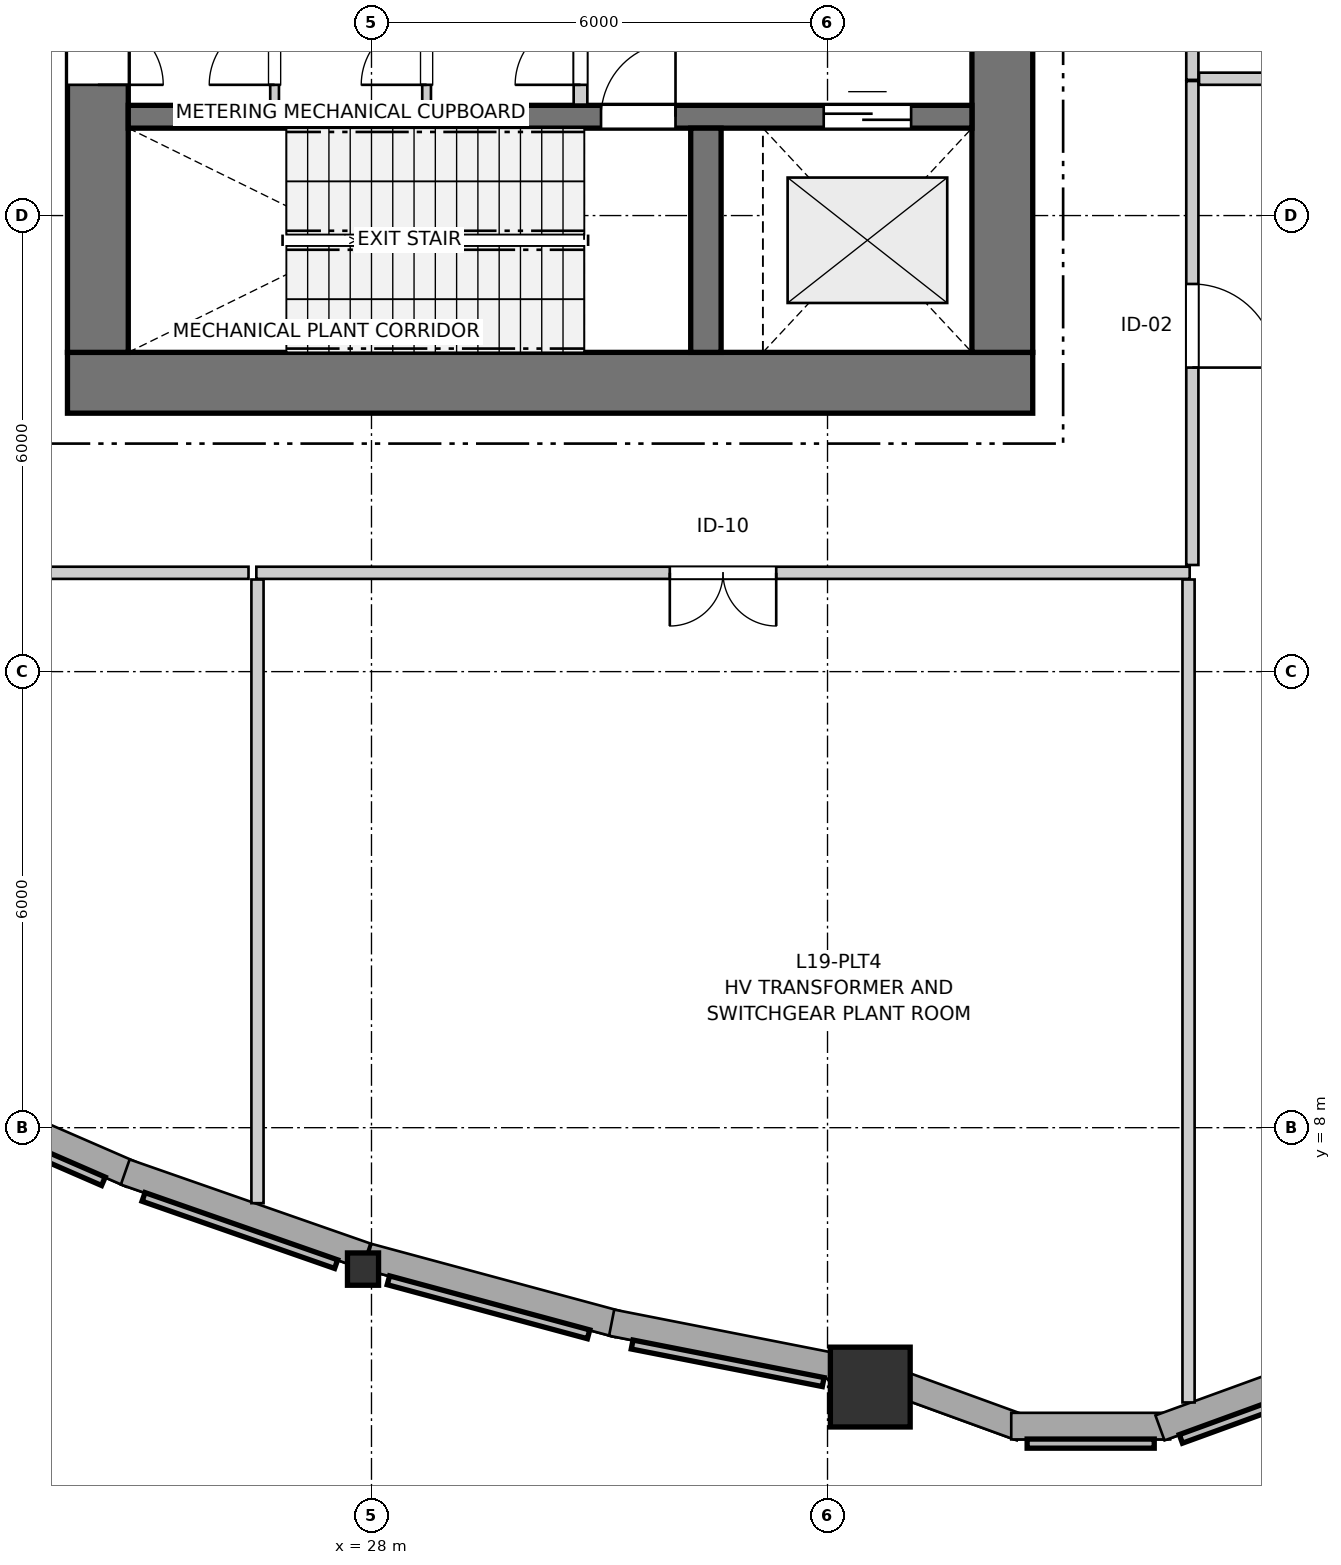
"""IFC4 building model, lengths in metres.
Left out: names, types, materials, properties, quantities, classifications, styles, units other than length and angle.
Written with IfcOpenShell. Run it as: python <this file> out.ifc"""

import sys

from ifc_helpers import new_model, si_unit, direction, frame, frame_2d, origin, origin_2d, place, context, subcontext, project, spatial, rectangle, i_section, extrude, source, transform, mapped, element, fill, save


model = new_model("IFC4")
c1 = context("Model", 3, precision=1e-05, world=origin(), true_north=direction((0.0, 1.0)))
c2 = subcontext(c1, "Body", "Model", "MODEL_VIEW")
j1 = project(units=[si_unit("LENGTHUNIT", "METRE"), si_unit("PLANEANGLEUNIT", "RADIAN")], contexts=[c1])
p1 = place(None, origin())
s1 = spatial("IfcSite", under=j1, at=p1, CompositionType="ELEMENT")
p2 = place(p1, origin())
s2 = spatial("IfcBuilding", under=s1, at=p2, CompositionType="ELEMENT")
p3 = place(p2, frame((0.0, 0.0, 65.4)))
s3 = spatial("IfcBuildingStorey", under=s2, at=p3, CompositionType="ELEMENT", Elevation=65.4)
p4 = place(p3, frame((24.0, 17.8, 0.0), z_axis=(0.0, 0.0, 1.0), x_axis=(1.0, 0.0, 0.0)))
e1 = element("IfcWall", 1, at=p4, inside=s3, PredefinedType="SHEAR", context=c2, shape_type="SweptSolid", body=[
    extrude(rectangle(XDim=12.7, YDim=0.8, at=frame_2d((6.35, 0.0))), origin(), (0.0, 0.0, 1.0), 4.75),
])
p5 = place(p3, frame((24.4, 33.8, 0.0), z_axis=(0.0, 0.0, 1.0), x_axis=(0.0, -1.0, 0.0)))
e2 = element("IfcWall", 2, at=p5, inside=s3, PredefinedType="SHEAR", context=c2, shape_type="SweptSolid", body=[
    extrude(rectangle(XDim=15.6, YDim=0.8, at=frame_2d((7.8, 0.0))), origin(), (0.0, 0.0, 1.0), 4.75),
])
p6 = place(p5, frame((7.05, 0.0, 0.0)))
e3 = element("IfcOpeningElement", 3, at=p6, cuts=e2, PredefinedType="OPENING", context=c2, shape_type="SweptSolid", body=[
    extrude(rectangle(XDim=1.5, YDim=2.15, at=frame_2d((0.75, 1.075))), frame((0.0, 0.41, 0.0), z_axis=(0.0, -1.0, 0.0), x_axis=(1.0, 0.0, 0.0)), (0.0, 0.0, 1.0), 0.82),
])
p7 = place(p5, frame((3.52, 0.0, 0.0)))
e4 = element("IfcOpeningElement", 4, at=p7, cuts=e2, PredefinedType="OPENING", context=c2, shape_type="SweptSolid", body=[
    extrude(rectangle(XDim=0.86, YDim=2.05, at=frame_2d((0.43, 1.025))), frame((0.0, 0.41, 0.0), z_axis=(0.0, -1.0, 0.0), x_axis=(1.0, 0.0, 0.0)), (0.0, 0.0, 1.0), 0.82),
])
p8 = place(p5, frame((11.22, 0.0, 0.0)))
e5 = element("IfcOpeningElement", 5, at=p8, cuts=e2, PredefinedType="OPENING", context=c2, shape_type="SweptSolid", body=[
    extrude(rectangle(XDim=0.86, YDim=2.05, at=frame_2d((0.43, 1.025))), frame((0.0, 0.41, 0.0), z_axis=(0.0, -1.0, 0.0), x_axis=(1.0, 0.0, 0.0)), (0.0, 0.0, 1.0), 0.82),
])
p9 = place(p3, frame((36.3, 18.2, 0.0), z_axis=(0.0, 0.0, 1.0), x_axis=(0.0, 1.0, 0.0)))
e6 = element("IfcWall", 6, at=p9, inside=s3, PredefinedType="SHEAR", context=c2, shape_type="SweptSolid", body=[
    extrude(rectangle(XDim=15.6, YDim=0.8, at=frame_2d((7.8, 0.0))), origin(), (0.0, 0.0, 1.0), 4.75),
])
p10 = place(p9, frame((4.25, 0.0, 0.0)))
e7 = element("IfcOpeningElement", 7, at=p10, cuts=e6, PredefinedType="OPENING", context=c2, shape_type="SweptSolid", body=[
    extrude(rectangle(XDim=1.1, YDim=2.15, at=frame_2d((0.55, 1.075))), frame((0.0, 0.41, 0.0), z_axis=(0.0, -1.0, 0.0), x_axis=(1.0, 0.0, 0.0)), (0.0, 0.0, 1.0), 0.82),
])
p11 = place(p9, frame((10.25, 0.0, 0.0)))
e8 = element("IfcOpeningElement", 8, at=p11, cuts=e6, PredefinedType="OPENING", context=c2, shape_type="SweptSolid", body=[
    extrude(rectangle(XDim=1.1, YDim=2.15, at=frame_2d((0.55, 1.075))), frame((0.0, 0.41, 0.0), z_axis=(0.0, -1.0, 0.0), x_axis=(1.0, 0.0, 0.0)), (0.0, 0.0, 1.0), 0.82),
])
p12 = place(p3, frame((24.8, 21.3, 0.0), z_axis=(0.0, 0.0, 1.0), x_axis=(1.0, 0.0, 0.0)))
e9 = element("IfcWall", 9, at=p12, inside=s3, PredefinedType="SHEAR", context=c2, shape_type="SweptSolid", body=[
    extrude(rectangle(XDim=11.1, YDim=0.3, at=frame_2d((5.55, 0.0))), origin(), (0.0, 0.0, 1.0), 4.75),
])
p13 = place(p12, frame((6.22, 0.0, 0.0)))
e10 = element("IfcOpeningElement", 10, at=p13, cuts=e9, PredefinedType="OPENING", context=c2, shape_type="SweptSolid", body=[
    extrude(rectangle(XDim=0.98, YDim=2.15, at=frame_2d((0.49, 1.075))), frame((0.0, 0.16, 0.0), z_axis=(0.0, -1.0, 0.0), x_axis=(1.0, 0.0, 0.0)), (0.0, 0.0, 1.0), 0.32),
])
p14 = place(p12, frame((9.15, 0.0, 0.0)))
e11 = element("IfcOpeningElement", 11, at=p14, cuts=e9, PredefinedType="OPENING", context=c2, shape_type="SweptSolid", body=[
    extrude(rectangle(XDim=1.15, YDim=2.15, at=frame_2d((0.575, 1.075))), frame((0.0, 0.16, 0.0), z_axis=(0.0, -1.0, 0.0), x_axis=(1.0, 0.0, 0.0)), (0.0, 0.0, 1.0), 0.32),
])
p15 = place(p3, frame((32.4, 18.2, 0.0), z_axis=(0.0, 0.0, 1.0), x_axis=(0.0, 1.0, 0.0)))
e12 = element("IfcWall", 12, at=p15, inside=s3, PredefinedType="SHEAR", context=c2, shape_type="SweptSolid", body=[
    extrude(rectangle(XDim=2.95, YDim=0.4, at=frame_2d((1.475, 0.0))), origin(), (0.0, 0.0, 1.0), 4.75),
])
m1 = source(origin(), c2, "Body", "SweptSolid", [
    extrude(i_section(OverallWidth=0.409, OverallDepth=0.425, WebThickness=0.03, FlangeThickness=0.048, FilletRadius=0.015, at=origin_2d()), origin(), (0.0, 0.0, 1.0), 4.75),
])
p16 = place(p3, frame((27.888, 6.139, 0.0), z_axis=(0.0, 0.0, 1.0), x_axis=(1.0, 0.0, 0.0)))
e13 = element("IfcColumn", 13, at=p16, inside=s3, PredefinedType="PILASTER", context=c2, shape_type="MappedRepresentation", body=[
    mapped(m1, transform((0.0, 0.0, 0.0), x_axis=(1.0, 0.0, 0.0), y_axis=(0.0, 1.0, 0.0), z_axis=(0.0, 0.0, 1.0), scale=1.0)),
])
m2 = source(origin(), c2, "Body", "SweptSolid", [
    extrude(rectangle(XDim=1.05, YDim=1.05, at=origin_2d()), origin(), (0.0, 0.0, 1.0), 4.75),
])
p17 = place(p3, frame((34.562, 4.587, 0.0), z_axis=(0.0, 0.0, 1.0), x_axis=(1.0, 0.0, 0.0)))
e14 = element("IfcColumn", 14, at=p17, inside=s3, PredefinedType="COLUMN", context=c2, shape_type="MappedRepresentation", body=[
    mapped(m2, transform((0.0, 0.0, 0.0), x_axis=(1.0, 0.0, 0.0), y_axis=(0.0, 1.0, 0.0), z_axis=(0.0, 0.0, 1.0), scale=1.0)),
])
p18 = place(p3, frame((22.058, 8.595, 0.0), z_axis=(0.0, 0.0, 1.0), x_axis=(0.917112224483, -0.398629110458, 0.0)))
e15 = element("IfcWall", 15, at=p18, inside=s3, PredefinedType="SOLIDWALL", context=c2, shape_type="SweptSolid", body=[
    extrude(rectangle(XDim=3.037, YDim=0.35, at=frame_2d((1.519, 0.0))), origin(), (0.0, 0.0, 1.0), 4.23),
])
p19 = place(p3, frame((24.76, 7.417, 0.0), z_axis=(0.0, 0.0, 1.0), x_axis=(0.944134890247, -0.329559264804, 0.0)))
e16 = element("IfcWall", 16, at=p19, inside=s3, PredefinedType="SOLIDWALL", context=c2, shape_type="SweptSolid", body=[
    extrude(rectangle(XDim=3.354, YDim=0.35, at=frame_2d((1.677, 0.0))), origin(), (0.0, 0.0, 1.0), 4.23),
])
p20 = place(p3, frame((27.953, 6.303, 0.0), z_axis=(0.0, 0.0, 1.0), x_axis=(0.965464207527, -0.260535724968, 0.0)))
e17 = element("IfcWall", 17, at=p20, inside=s3, PredefinedType="SOLIDWALL", context=c2, shape_type="SweptSolid", body=[
    extrude(rectangle(XDim=3.41, YDim=0.35, at=frame_2d((1.705, 0.0))), origin(), (0.0, 0.0, 1.0), 4.23),
])
p21 = place(p3, frame((31.16, 5.435, 0.0), z_axis=(0.0, 0.0, 1.0), x_axis=(0.981237747431, -0.192801667567, 0.0)))
e18 = element("IfcWall", 18, at=p21, inside=s3, PredefinedType="SOLIDWALL", context=c2, shape_type="SweptSolid", body=[
    extrude(rectangle(XDim=3.202, YDim=0.35, at=frame_2d((1.601, 0.0))), origin(), (0.0, 0.0, 1.0), 4.23),
])
p22 = place(p3, frame((34.904, 4.649, 0.0), z_axis=(0.0, 0.0, 1.0), x_axis=(0.939675390388, -0.342067479745, 0.0)))
e19 = element("IfcWall", 19, at=p22, inside=s3, PredefinedType="SOLIDWALL", context=c2, shape_type="SweptSolid", body=[
    extrude(rectangle(XDim=1.752, YDim=0.35, at=frame_2d((0.876, 0.0))), origin(), (0.0, 0.0, 1.0), 4.23),
])
p23 = place(p3, frame((36.417, 4.073, 0.0), z_axis=(0.0, 0.0, 1.0), x_axis=(1.0, 0.0, 0.0)))
e20 = element("IfcWall", 20, at=p23, inside=s3, PredefinedType="SOLIDWALL", context=c2, shape_type="SweptSolid", body=[
    extrude(rectangle(XDim=2.091, YDim=0.35, at=frame_2d((1.045, 0.0))), origin(), (0.0, 0.0, 1.0), 4.23),
])
p24 = place(p3, frame((38.374, 4.05, 0.0), z_axis=(0.0, 0.0, 1.0), x_axis=(0.939711556618, 0.341968113072, 0.0)))
e21 = element("IfcWall", 21, at=p24, inside=s3, PredefinedType="SOLIDWALL", context=c2, shape_type="SweptSolid", body=[
    extrude(rectangle(XDim=2.09, YDim=0.35, at=frame_2d((1.045, 0.0))), origin(), (0.0, 0.0, 1.0), 4.23),
])
p25 = place(p3, frame((30.75, 21.46, 0.0), z_axis=(0.0, 0.0, 1.0), x_axis=(0.0, 1.0, 0.0)))
e22 = element("IfcWall", 22, at=p25, inside=s3, PredefinedType="PARTITIONING", context=c2, shape_type="SweptSolid", body=[
    extrude(rectangle(XDim=3.11, YDim=0.18, at=frame_2d((1.555, 0.0))), origin(), (0.0, 0.0, 1.0), 4.75),
])
p26 = place(p25, frame((0.26, 0.0, 0.0)))
e23 = element("IfcOpeningElement", 23, at=p26, cuts=e22, PredefinedType="OPENING", context=c2, shape_type="SweptSolid", body=[
    extrude(rectangle(XDim=0.86, YDim=2.05, at=frame_2d((0.43, 1.025))), frame((0.0, 0.1, 0.0), z_axis=(0.0, -1.0, 0.0), x_axis=(1.0, 0.0, 0.0)), (0.0, 0.0, 1.0), 0.2),
])
p27 = place(p3, frame((26.725, 21.46, 0.0), z_axis=(0.0, 0.0, 1.0), x_axis=(0.0, 1.0, 0.0)))
e24 = element("IfcWall", 24, at=p27, inside=s3, PredefinedType="PARTITIONING", context=c2, shape_type="SweptSolid", body=[
    extrude(rectangle(XDim=1.38, YDim=0.115, at=frame_2d((0.69, 0.0))), origin(), (0.0, 0.0, 1.0), 4.75),
])
p28 = place(p27, frame((0.26, 0.0, 0.0)))
e25 = element("IfcOpeningElement", 25, at=p28, cuts=e24, PredefinedType="OPENING", context=c2, shape_type="SweptSolid", body=[
    extrude(rectangle(XDim=0.86, YDim=2.05, at=frame_2d((0.43, 1.025))), frame((0.0, 0.067, 0.0), z_axis=(0.0, -1.0, 0.0), x_axis=(1.0, 0.0, 0.0)), (0.0, 0.0, 1.0), 0.135),
])
p29 = place(p3, frame((28.725, 21.46, 0.0), z_axis=(0.0, 0.0, 1.0), x_axis=(0.0, 1.0, 0.0)))
e26 = element("IfcWall", 26, at=p29, inside=s3, PredefinedType="PARTITIONING", context=c2, shape_type="SweptSolid", body=[
    extrude(rectangle(XDim=1.38, YDim=0.115, at=frame_2d((0.69, 0.0))), origin(), (0.0, 0.0, 1.0), 4.75),
])
p30 = place(p29, frame((0.26, 0.0, 0.0)))
e27 = element("IfcOpeningElement", 27, at=p30, cuts=e26, PredefinedType="OPENING", context=c2, shape_type="SweptSolid", body=[
    extrude(rectangle(XDim=0.86, YDim=2.05, at=frame_2d((0.43, 1.025))), frame((0.0, 0.067, 0.0), z_axis=(0.0, -1.0, 0.0), x_axis=(1.0, 0.0, 0.0)), (0.0, 0.0, 1.0), 0.135),
])
p31 = place(p3, frame((38.765, 15.3, 0.0), z_axis=(0.0, 0.0, 1.0), x_axis=(-1.0, 0.0, 0.0)))
e28 = element("IfcWall", 28, at=p31, inside=s3, PredefinedType="PARTITIONING", context=c2, shape_type="SweptSolid", body=[
    extrude(rectangle(XDim=12.28, YDim=0.16, at=frame_2d((6.14, 0.0))), origin(), (0.0, 0.0, 1.0), 4.75),
])
p32 = place(p31, frame((5.44, 0.0, 0.0)))
e29 = element("IfcOpeningElement", 29, at=p32, cuts=e28, PredefinedType="OPENING", context=c2, shape_type="SweptSolid", body=[
    extrude(rectangle(XDim=1.4, YDim=2.15, at=frame_2d((0.7, 1.075))), frame((0.0, 0.09, 0.0), z_axis=(0.0, -1.0, 0.0), x_axis=(1.0, 0.0, 0.0)), (0.0, 0.0, 1.0), 0.18),
])
p33 = place(p3, frame((38.8, 30.215, 0.0), z_axis=(0.0, 0.0, 1.0), x_axis=(0.0, -1.0, 0.0)))
e30 = element("IfcWall", 30, at=p33, inside=s3, PredefinedType="PARTITIONING", context=c2, shape_type="SweptSolid", body=[
    extrude(rectangle(XDim=8.43, YDim=0.16, at=frame_2d((4.215, 0.0))), origin(), (0.0, 0.0, 1.0), 4.75),
])
p34 = place(p33, frame((3.515, 0.0, 0.0)))
e31 = element("IfcOpeningElement", 31, at=p34, cuts=e30, PredefinedType="OPENING", context=c2, shape_type="SweptSolid", body=[
    extrude(rectangle(XDim=1.4, YDim=2.15, at=frame_2d((0.7, 1.075))), frame((0.0, 0.09, 0.0), z_axis=(0.0, -1.0, 0.0), x_axis=(1.0, 0.0, 0.0)), (0.0, 0.0, 1.0), 0.18),
])
p35 = place(p3, frame((38.8, 21.77, 0.0), z_axis=(0.0, 0.0, 1.0), x_axis=(0.0, -1.0, 0.0)))
e32 = element("IfcWall", 32, at=p35, inside=s3, PredefinedType="PARTITIONING", context=c2, shape_type="SweptSolid", body=[
    extrude(rectangle(XDim=6.367, YDim=0.16, at=frame_2d((3.184, 0.0))), origin(), (0.0, 0.0, 1.0), 4.75),
])
p36 = place(p35, frame((2.67, 0.0, 0.0)))
e33 = element("IfcOpeningElement", 33, at=p36, cuts=e32, PredefinedType="OPENING", context=c2, shape_type="SweptSolid", body=[
    extrude(rectangle(XDim=1.1, YDim=2.15, at=frame_2d((0.55, 1.075))), frame((0.0, 0.09, 0.0), z_axis=(0.0, -1.0, 0.0), x_axis=(1.0, 0.0, 0.0)), (0.0, 0.0, 1.0), 0.18),
])
p37 = place(p3, frame((38.75, 4.385, 0.0), z_axis=(0.0, 0.0, 1.0), x_axis=(0.0, 1.0, 0.0)))
e34 = element("IfcWall", 34, at=p37, inside=s3, PredefinedType="PARTITIONING", context=c2, shape_type="SweptSolid", body=[
    extrude(rectangle(XDim=10.827, YDim=0.16, at=frame_2d((5.414, 0.0))), origin(), (0.0, 0.0, 1.0), 4.75),
])
p38 = place(p3, frame((26.5, 7.007, 0.0), z_axis=(0.0, 0.0, 1.0), x_axis=(0.0, 1.0, 0.0)))
e35 = element("IfcWall", 35, at=p38, inside=s3, PredefinedType="PARTITIONING", context=c2, shape_type="SweptSolid", body=[
    extrude(rectangle(XDim=8.205, YDim=0.16, at=frame_2d((4.103, 0.0))), origin(), (0.0, 0.0, 1.0), 4.75),
])
p39 = place(p3, frame((38.888, 21.8, 0.0), z_axis=(0.0, 0.0, 1.0), x_axis=(1.0, 0.0, 0.0)))
e36 = element("IfcWall", 36, at=p39, inside=s3, PredefinedType="PARTITIONING", context=c2, shape_type="SweptSolid", body=[
    extrude(rectangle(XDim=6.89, YDim=0.16, at=frame_2d((3.445, 0.0))), origin(), (0.0, 0.0, 1.0), 4.75),
])
p40 = place(p3, frame((21.988, 15.3, 0.0), z_axis=(0.0, 0.0, 1.0), x_axis=(1.0, 0.0, 0.0)))
e37 = element("IfcWall", 37, at=p40, inside=s3, PredefinedType="PARTITIONING", context=c2, shape_type="SweptSolid", body=[
    extrude(rectangle(XDim=4.394, YDim=0.16, at=frame_2d((2.197, 0.0))), origin(), (0.0, 0.0, 1.0), 4.75),
])
m3 = source(origin(), c2, "Body", "SweptSolid", [
    extrude(rectangle(XDim=0.98, YDim=2.15, at=frame_2d((0.49, 1.075))), frame((0.0, 0.025, 0.0), z_axis=(0.0, -1.0, 0.0), x_axis=(1.0, 0.0, 0.0)), (0.0, 0.0, 1.0), 0.05),
])
p41 = place(p13, origin())
e38 = element("IfcDoor", 38, at=p41, inside=s3, OperationType="SINGLE_SWING_RIGHT", PredefinedType="DOOR", context=c2, shape_type="MappedRepresentation", body=[
    mapped(m3, transform((0.0, 0.0, 0.0), x_axis=(1.0, 0.0, 0.0), y_axis=(0.0, 1.0, 0.0), z_axis=(0.0, 0.0, 1.0), scale=1.0)),
])
fill(e10, e38)
m4 = source(origin(), c2, "Body", "SweptSolid", [
    extrude(rectangle(XDim=1.15, YDim=2.15, at=frame_2d((0.575, 1.075))), frame((0.0, 0.025, 0.0), z_axis=(0.0, -1.0, 0.0), x_axis=(1.0, 0.0, 0.0)), (0.0, 0.0, 1.0), 0.05),
])
p42 = place(p14, origin())
e39 = element("IfcDoor", 39, at=p42, inside=s3, OperationType="DOUBLE_DOOR_SLIDING", PredefinedType="DOOR", context=c2, shape_type="MappedRepresentation", body=[
    mapped(m4, transform((0.0, 0.0, 0.0), x_axis=(1.0, 0.0, 0.0), y_axis=(0.0, 1.0, 0.0), z_axis=(0.0, 0.0, 1.0), scale=1.0)),
])
fill(e11, e39)
m5 = source(origin(), c2, "Body", "SweptSolid", [
    extrude(rectangle(XDim=0.86, YDim=2.05, at=frame_2d((0.43, 1.025))), frame((0.0, 0.025, 0.0), z_axis=(0.0, -1.0, 0.0), x_axis=(1.0, 0.0, 0.0)), (0.0, 0.0, 1.0), 0.05),
])
p43 = place(p8, origin())
e40 = element("IfcDoor", 40, at=p43, inside=s3, OperationType="SINGLE_SWING_RIGHT", PredefinedType="DOOR", context=c2, shape_type="MappedRepresentation", body=[
    mapped(m5, transform((0.0, 0.0, 0.0), x_axis=(1.0, 0.0, 0.0), y_axis=(0.0, 1.0, 0.0), z_axis=(0.0, 0.0, 1.0), scale=1.0)),
])
fill(e5, e40)
p44 = place(p26, origin())
e41 = element("IfcDoor", 41, at=p44, inside=s3, OperationType="SINGLE_SWING_LEFT", PredefinedType="DOOR", context=c2, shape_type="MappedRepresentation", body=[
    mapped(m5, transform((0.0, 0.0, 0.0), x_axis=(1.0, 0.0, 0.0), y_axis=(0.0, 1.0, 0.0), z_axis=(0.0, 0.0, 1.0), scale=1.0)),
])
fill(e23, e41)
p45 = place(p28, origin())
e42 = element("IfcDoor", 42, at=p45, inside=s3, OperationType="SINGLE_SWING_LEFT", PredefinedType="DOOR", context=c2, shape_type="MappedRepresentation", body=[
    mapped(m5, transform((0.0, 0.0, 0.0), x_axis=(1.0, 0.0, 0.0), y_axis=(0.0, 1.0, 0.0), z_axis=(0.0, 0.0, 1.0), scale=1.0)),
])
fill(e25, e42)
p46 = place(p30, origin())
e43 = element("IfcDoor", 43, at=p46, inside=s3, OperationType="SINGLE_SWING_LEFT", PredefinedType="DOOR", context=c2, shape_type="MappedRepresentation", body=[
    mapped(m5, transform((0.0, 0.0, 0.0), x_axis=(1.0, 0.0, 0.0), y_axis=(0.0, 1.0, 0.0), z_axis=(0.0, 0.0, 1.0), scale=1.0)),
])
fill(e27, e43)
m6 = source(origin(), c2, "Body", "SweptSolid", [
    extrude(rectangle(XDim=1.4, YDim=2.15, at=frame_2d((0.7, 1.075))), frame((0.0, 0.025, 0.0), z_axis=(0.0, -1.0, 0.0), x_axis=(1.0, 0.0, 0.0)), (0.0, 0.0, 1.0), 0.05),
])
p47 = place(p32, origin())
e44 = element("IfcDoor", 44, at=p47, inside=s3, OperationType="DOUBLE_DOOR_SINGLE_SWING", PredefinedType="DOOR", context=c2, shape_type="MappedRepresentation", body=[
    mapped(m6, transform((0.0, 0.0, 0.0), x_axis=(1.0, 0.0, 0.0), y_axis=(0.0, 1.0, 0.0), z_axis=(0.0, 0.0, 1.0), scale=1.0)),
])
fill(e29, e44)
m7 = source(origin(), c2, "Body", "SweptSolid", [
    extrude(rectangle(XDim=1.1, YDim=2.15, at=frame_2d((0.55, 1.075))), frame((0.0, 0.025, 0.0), z_axis=(0.0, -1.0, 0.0), x_axis=(1.0, 0.0, 0.0)), (0.0, 0.0, 1.0), 0.05),
])
p48 = place(p36, origin())
e45 = element("IfcDoor", 45, at=p48, inside=s3, OperationType="SINGLE_SWING_RIGHT", PredefinedType="DOOR", context=c2, shape_type="MappedRepresentation", body=[
    mapped(m7, transform((0.0, 0.0, 0.0), x_axis=(1.0, 0.0, 0.0), y_axis=(0.0, 1.0, 0.0), z_axis=(0.0, 0.0, 1.0), scale=1.0)),
])
fill(e33, e45)
save(model, sys.argv[1])
